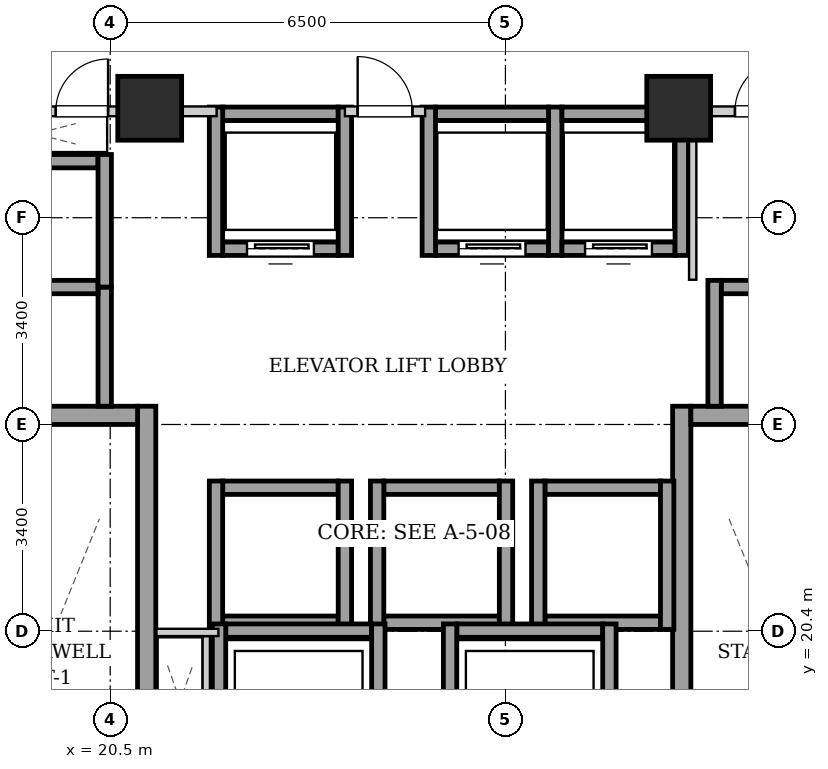
"""IFC4 building model, lengths in metres.
Left out: names, types, materials, properties, quantities, classifications, styles, units other than length and angle.
Written with IfcOpenShell. Run it as: python <this file> out.ifc"""

import sys

from ifc_helpers import new_model, si_unit, direction, frame, frame_2d, origin, origin_2d, place, context, subcontext, project, spatial, rectangle, extrude, element, fill, save


model = new_model("IFC4")
c1 = context("Model", 3, precision=1e-05, world=origin(), true_north=direction((0.0, 1.0)))
c2 = subcontext(c1, "Body", "Model", "MODEL_VIEW")
j1 = project(units=[si_unit("LENGTHUNIT", "METRE"), si_unit("PLANEANGLEUNIT", "RADIAN")], contexts=[c1])
p1 = place(None, origin())
s1 = spatial("IfcSite", under=j1, at=p1, CompositionType="ELEMENT")
p2 = place(p1, origin())
s2 = spatial("IfcBuilding", under=s1, at=p2, CompositionType="ELEMENT")
p3 = place(p2, frame((0.0, 0.0, 113.5)))
s3 = spatial("IfcBuildingStorey", under=s2, at=p3, CompositionType="ELEMENT", Elevation=113.5)
for number, where, z_axis, x_axis in (
    (1, (21.15, 29.0, 0.0), (0.0, 0.0, 1.0), (1.0, 0.0, 0.0)),
    (2, (29.85, 29.0, 0.0), (0.0, 0.0, 1.0), (1.0, 0.0, 0.0)),
):
    element("IfcColumn", number, at=place(p3, frame(where, z_axis=z_axis, x_axis=x_axis)), inside=s3, PredefinedType="COLUMN", context=c2, shape_type="SweptSolid", body=[
        extrude(rectangle(XDim=1.05, YDim=1.05, at=origin_2d()), origin(), (0.0, 0.0, 1.0), 3.2),
    ])
p4 = place(p3, frame((21.1, 15.1, 0.0), z_axis=(0.0, 0.0, 1.0), x_axis=(0.0, 1.0, 0.0)))
e3 = element("IfcWall", 3, at=p4, inside=s3, PredefinedType="SHEAR", context=c2, shape_type="SweptSolid", body=[
    extrude(rectangle(XDim=9.0, YDim=0.3, at=frame_2d((4.5, 0.0))), origin(), (0.0, 0.0, 1.0), 2.94),
])
p5 = place(p3, frame((18.1, 23.95, 0.0), z_axis=(0.0, 0.0, 1.0), x_axis=(1.0, 0.0, 0.0)))
e4 = element("IfcWall", 4, at=p5, inside=s3, PredefinedType="SHEAR", context=c2, shape_type="SweptSolid", body=[
    extrude(rectangle(XDim=2.85, YDim=0.3, at=frame_2d((1.425, 0.0))), origin(), (0.0, 0.0, 1.0), 2.94),
])
p6 = place(p3, frame((29.9, 15.1, 0.0), z_axis=(0.0, 0.0, 1.0), x_axis=(0.0, 1.0, 0.0)))
e5 = element("IfcWall", 5, at=p6, inside=s3, PredefinedType="SHEAR", context=c2, shape_type="SweptSolid", body=[
    extrude(rectangle(XDim=9.0, YDim=0.3, at=frame_2d((4.5, 0.0))), origin(), (0.0, 0.0, 1.0), 2.94),
])
p7 = place(p3, frame((30.05, 23.95, 0.0), z_axis=(0.0, 0.0, 1.0), x_axis=(1.0, 0.0, 0.0)))
e6 = element("IfcWall", 6, at=p7, inside=s3, PredefinedType="SHEAR", context=c2, shape_type="SweptSolid", body=[
    extrude(rectangle(XDim=2.85, YDim=0.3, at=frame_2d((1.425, 0.0))), origin(), (0.0, 0.0, 1.0), 2.94),
])
p8 = place(p3, frame((22.35, 26.69, 0.0), z_axis=(0.0, 0.0, 1.0), x_axis=(1.0, 0.0, 0.0)))
e7 = element("IfcWall", 7, at=p8, inside=s3, PredefinedType="SHEAR", context=c2, shape_type="SweptSolid", body=[
    extrude(rectangle(XDim=1.9, YDim=0.22, at=frame_2d((0.95, 0.0))), origin(), (0.0, 0.0, 1.0), 2.94),
])
p9 = place(p8, frame((0.4, 0.0, 0.0)))
e8 = element("IfcOpeningElement", 8, at=p9, cuts=e7, PredefinedType="OPENING", context=c2, shape_type="SweptSolid", body=[
    extrude(rectangle(XDim=1.1, YDim=2.15, at=frame_2d((0.55, 1.075))), frame((0.0, 0.12, 0.0), z_axis=(0.0, -1.0, 0.0), x_axis=(1.0, 0.0, 0.0)), (0.0, 0.0, 1.0), 0.24),
])
p10 = place(p3, frame((22.35, 28.91, 0.0), z_axis=(0.0, 0.0, 1.0), x_axis=(1.0, 0.0, 0.0)))
e9 = element("IfcWall", 9, at=p10, inside=s3, PredefinedType="SHEAR", context=c2, shape_type="SweptSolid", body=[
    extrude(rectangle(XDim=1.9, YDim=0.22, at=frame_2d((0.95, 0.0))), origin(), (0.0, 0.0, 1.0), 2.94),
])
for number, where, z_axis, x_axis in (
    (10, (22.24, 26.58, 0.0), (0.0, 0.0, 1.0), (0.0, 1.0, 0.0)),
    (11, (24.36, 26.58, 0.0), (0.0, 0.0, 1.0), (0.0, 1.0, 0.0)),
):
    element("IfcWall", number, at=place(p3, frame(where, z_axis=z_axis, x_axis=x_axis)), inside=s3, PredefinedType="SHEAR", context=c2, shape_type="SweptSolid", body=[
        extrude(rectangle(XDim=2.44, YDim=0.22, at=frame_2d((1.22, 0.0))), origin(), (0.0, 0.0, 1.0), 2.94),
    ])
p11 = place(p3, frame((25.85, 26.69, 0.0), z_axis=(0.0, 0.0, 1.0), x_axis=(1.0, 0.0, 0.0)))
e12 = element("IfcWall", 12, at=p11, inside=s3, PredefinedType="SHEAR", context=c2, shape_type="SweptSolid", body=[
    extrude(rectangle(XDim=1.86, YDim=0.22, at=frame_2d((0.93, 0.0))), origin(), (0.0, 0.0, 1.0), 2.94),
])
p12 = place(p11, frame((0.38, 0.0, 0.0)))
e13 = element("IfcOpeningElement", 13, at=p12, cuts=e12, PredefinedType="OPENING", context=c2, shape_type="SweptSolid", body=[
    extrude(rectangle(XDim=1.1, YDim=2.15, at=frame_2d((0.55, 1.075))), frame((0.0, 0.12, 0.0), z_axis=(0.0, -1.0, 0.0), x_axis=(1.0, 0.0, 0.0)), (0.0, 0.0, 1.0), 0.24),
])
p13 = place(p3, frame((25.85, 28.91, 0.0), z_axis=(0.0, 0.0, 1.0), x_axis=(1.0, 0.0, 0.0)))
e14 = element("IfcWall", 14, at=p13, inside=s3, PredefinedType="SHEAR", context=c2, shape_type="SweptSolid", body=[
    extrude(rectangle(XDim=1.86, YDim=0.22, at=frame_2d((0.93, 0.0))), origin(), (0.0, 0.0, 1.0), 2.94),
])
for number, where, z_axis, x_axis in (
    (15, (25.74, 26.58, 0.0), (0.0, 0.0, 1.0), (0.0, 1.0, 0.0)),
    (16, (27.82, 26.58, 0.0), (0.0, 0.0, 1.0), (0.0, 1.0, 0.0)),
):
    element("IfcWall", number, at=place(p3, frame(where, z_axis=z_axis, x_axis=x_axis)), inside=s3, PredefinedType="SHEAR", context=c2, shape_type="SweptSolid", body=[
        extrude(rectangle(XDim=2.44, YDim=0.22, at=frame_2d((1.22, 0.0))), origin(), (0.0, 0.0, 1.0), 2.94),
    ])
p14 = place(p3, frame((27.93, 26.69, 0.0), z_axis=(0.0, 0.0, 1.0), x_axis=(1.0, 0.0, 0.0)))
e17 = element("IfcWall", 17, at=p14, inside=s3, PredefinedType="SHEAR", context=c2, shape_type="SweptSolid", body=[
    extrude(rectangle(XDim=1.86, YDim=0.22, at=frame_2d((0.93, 0.0))), origin(), (0.0, 0.0, 1.0), 2.94),
])
p15 = place(p14, frame((0.38, 0.0, 0.0)))
e18 = element("IfcOpeningElement", 18, at=p15, cuts=e17, PredefinedType="OPENING", context=c2, shape_type="SweptSolid", body=[
    extrude(rectangle(XDim=1.1, YDim=2.15, at=frame_2d((0.55, 1.075))), frame((0.0, 0.12, 0.0), z_axis=(0.0, -1.0, 0.0), x_axis=(1.0, 0.0, 0.0)), (0.0, 0.0, 1.0), 0.24),
])
p16 = place(p3, frame((27.93, 28.91, 0.0), z_axis=(0.0, 0.0, 1.0), x_axis=(1.0, 0.0, 0.0)))
e19 = element("IfcWall", 19, at=p16, inside=s3, PredefinedType="SHEAR", context=c2, shape_type="SweptSolid", body=[
    extrude(rectangle(XDim=1.86, YDim=0.22, at=frame_2d((0.93, 0.0))), origin(), (0.0, 0.0, 1.0), 2.94),
])
p17 = place(p3, frame((29.9, 26.58, 0.0), z_axis=(0.0, 0.0, 1.0), x_axis=(0.0, 1.0, 0.0)))
e20 = element("IfcWall", 20, at=p17, inside=s3, PredefinedType="SHEAR", context=c2, shape_type="SweptSolid", body=[
    extrude(rectangle(XDim=2.44, YDim=0.22, at=frame_2d((1.22, 0.0))), origin(), (0.0, 0.0, 1.0), 2.94),
])
for number, where, z_axis, x_axis in (
    (21, (22.35, 20.54, 0.0), (0.0, 0.0, 1.0), (1.0, 0.0, 0.0)),
    (22, (22.35, 22.76, 0.0), (0.0, 0.0, 1.0), (1.0, 0.0, 0.0)),
):
    element("IfcWall", number, at=place(p3, frame(where, z_axis=z_axis, x_axis=x_axis)), inside=s3, PredefinedType="SHEAR", context=c2, shape_type="SweptSolid", body=[
        extrude(rectangle(XDim=1.9, YDim=0.22, at=frame_2d((0.95, 0.0))), origin(), (0.0, 0.0, 1.0), 2.94),
    ])
for number, where, z_axis, x_axis in (
    (23, (22.24, 20.43, 0.0), (0.0, 0.0, 1.0), (0.0, 1.0, 0.0)),
    (24, (24.36, 20.43, 0.0), (0.0, 0.0, 1.0), (0.0, 1.0, 0.0)),
):
    element("IfcWall", number, at=place(p3, frame(where, z_axis=z_axis, x_axis=x_axis)), inside=s3, PredefinedType="SHEAR", context=c2, shape_type="SweptSolid", body=[
        extrude(rectangle(XDim=2.44, YDim=0.22, at=frame_2d((1.22, 0.0))), origin(), (0.0, 0.0, 1.0), 2.94),
    ])
for number, where, z_axis, x_axis in (
    (25, (25.0, 20.54, 0.0), (0.0, 0.0, 1.0), (1.0, 0.0, 0.0)),
    (26, (25.0, 22.76, 0.0), (0.0, 0.0, 1.0), (1.0, 0.0, 0.0)),
):
    element("IfcWall", number, at=place(p3, frame(where, z_axis=z_axis, x_axis=x_axis)), inside=s3, PredefinedType="SHEAR", context=c2, shape_type="SweptSolid", body=[
        extrude(rectangle(XDim=1.9, YDim=0.22, at=frame_2d((0.95, 0.0))), origin(), (0.0, 0.0, 1.0), 2.94),
    ])
for number, where, z_axis, x_axis in (
    (27, (24.89, 20.43, 0.0), (0.0, 0.0, 1.0), (0.0, 1.0, 0.0)),
    (28, (27.01, 20.43, 0.0), (0.0, 0.0, 1.0), (0.0, 1.0, 0.0)),
):
    element("IfcWall", number, at=place(p3, frame(where, z_axis=z_axis, x_axis=x_axis)), inside=s3, PredefinedType="SHEAR", context=c2, shape_type="SweptSolid", body=[
        extrude(rectangle(XDim=2.44, YDim=0.22, at=frame_2d((1.22, 0.0))), origin(), (0.0, 0.0, 1.0), 2.94),
    ])
for number, where, z_axis, x_axis in (
    (29, (27.65, 20.54, 0.0), (0.0, 0.0, 1.0), (1.0, 0.0, 0.0)),
    (30, (27.65, 22.76, 0.0), (0.0, 0.0, 1.0), (1.0, 0.0, 0.0)),
):
    element("IfcWall", number, at=place(p3, frame(where, z_axis=z_axis, x_axis=x_axis)), inside=s3, PredefinedType="SHEAR", context=c2, shape_type="SweptSolid", body=[
        extrude(rectangle(XDim=1.9, YDim=0.22, at=frame_2d((0.95, 0.0))), origin(), (0.0, 0.0, 1.0), 2.94),
    ])
for number, where, z_axis, x_axis in (
    (31, (27.54, 20.43, 0.0), (0.0, 0.0, 1.0), (0.0, 1.0, 0.0)),
    (32, (29.66, 20.43, 0.0), (0.0, 0.0, 1.0), (0.0, 1.0, 0.0)),
):
    element("IfcWall", number, at=place(p3, frame(where, z_axis=z_axis, x_axis=x_axis)), inside=s3, PredefinedType="SHEAR", context=c2, shape_type="SweptSolid", body=[
        extrude(rectangle(XDim=2.44, YDim=0.22, at=frame_2d((1.22, 0.0))), origin(), (0.0, 0.0, 1.0), 2.94),
    ])
p18 = place(p3, frame((20.41, 24.1, 0.0), z_axis=(0.0, 0.0, 1.0), x_axis=(0.0, 1.0, 0.0)))
e33 = element("IfcWall", 33, at=p18, inside=s3, PredefinedType="SHEAR", context=c2, shape_type="SweptSolid", body=[
    extrude(rectangle(XDim=1.96, YDim=0.22, at=frame_2d((0.98, 0.0))), origin(), (0.0, 0.0, 1.0), 2.94),
])
for number, where, z_axis, x_axis in (
    (34, (18.4, 26.06, 0.0), (0.0, 0.0, 1.0), (1.0, 0.0, 0.0)),
    (35, (18.4, 28.13, 0.0), (0.0, 0.0, 1.0), (1.0, 0.0, 0.0)),
):
    element("IfcWall", number, at=place(p3, frame(where, z_axis=z_axis, x_axis=x_axis)), inside=s3, PredefinedType="SHEAR", context=c2, shape_type="SweptSolid", body=[
        extrude(rectangle(XDim=1.9, YDim=0.22, at=frame_2d((0.95, 0.0))), origin(), (0.0, 0.0, 1.0), 2.94),
    ])
p19 = place(p3, frame((20.41, 26.06, 0.0), z_axis=(0.0, 0.0, 1.0), x_axis=(0.0, 1.0, 0.0)))
e36 = element("IfcWall", 36, at=p19, inside=s3, PredefinedType="SHEAR", context=c2, shape_type="SweptSolid", body=[
    extrude(rectangle(XDim=2.18, YDim=0.22, at=frame_2d((1.09, 0.0))), origin(), (0.0, 0.0, 1.0), 2.94),
])
p20 = place(p3, frame((30.55, 26.06, 0.0), z_axis=(0.0, 0.0, 1.0), x_axis=(1.0, 0.0, 0.0)))
e37 = element("IfcWall", 37, at=p20, inside=s3, PredefinedType="SHEAR", context=c2, shape_type="SweptSolid", body=[
    extrude(rectangle(XDim=1.9, YDim=0.22, at=frame_2d((0.95, 0.0))), origin(), (0.0, 0.0, 1.0), 2.94),
])
p21 = place(p3, frame((30.44, 24.1, 0.0), z_axis=(0.0, 0.0, 1.0), x_axis=(0.0, 1.0, 0.0)))
e38 = element("IfcWall", 38, at=p21, inside=s3, PredefinedType="SHEAR", context=c2, shape_type="SweptSolid", body=[
    extrude(rectangle(XDim=2.07, YDim=0.22, at=frame_2d((1.035, 0.0))), origin(), (0.0, 0.0, 1.0), 2.94),
])
p22 = place(p3, frame((22.4, 20.41, 0.0), z_axis=(0.0, 0.0, 1.0), x_axis=(1.0, 0.0, 0.0)))
e39 = element("IfcWall", 39, at=p22, inside=s3, PredefinedType="SHEAR", context=c2, shape_type="SweptSolid", body=[
    extrude(rectangle(XDim=2.4, YDim=0.22, at=frame_2d((1.2, 0.0))), origin(), (0.0, 0.0, 1.0), 2.94),
])
for number, where, z_axis, x_axis in (
    (40, (22.29, 17.98, 0.0), (0.0, 0.0, 1.0), (0.0, 1.0, 0.0)),
    (41, (24.91, 17.98, 0.0), (0.0, 0.0, 1.0), (0.0, 1.0, 0.0)),
):
    element("IfcWall", number, at=place(p3, frame(where, z_axis=z_axis, x_axis=x_axis)), inside=s3, PredefinedType="SHEAR", context=c2, shape_type="SweptSolid", body=[
        extrude(rectangle(XDim=2.54, YDim=0.22, at=frame_2d((1.27, 0.0))), origin(), (0.0, 0.0, 1.0), 2.94),
    ])
p23 = place(p3, frame((26.2, 20.41, 0.0), z_axis=(0.0, 0.0, 1.0), x_axis=(1.0, 0.0, 0.0)))
e42 = element("IfcWall", 42, at=p23, inside=s3, PredefinedType="SHEAR", context=c2, shape_type="SweptSolid", body=[
    extrude(rectangle(XDim=2.4, YDim=0.22, at=frame_2d((1.2, 0.0))), origin(), (0.0, 0.0, 1.0), 2.94),
])
for number, where, z_axis, x_axis in (
    (43, (26.09, 17.98, 0.0), (0.0, 0.0, 1.0), (0.0, 1.0, 0.0)),
    (44, (28.71, 17.98, 0.0), (0.0, 0.0, 1.0), (0.0, 1.0, 0.0)),
):
    element("IfcWall", number, at=place(p3, frame(where, z_axis=z_axis, x_axis=x_axis)), inside=s3, PredefinedType="SHEAR", context=c2, shape_type="SweptSolid", body=[
        extrude(rectangle(XDim=2.54, YDim=0.22, at=frame_2d((1.27, 0.0))), origin(), (0.0, 0.0, 1.0), 2.94),
    ])
p24 = place(p3, frame((24.36, 28.95, 0.0), z_axis=(0.0, 0.0, 1.0), x_axis=(1.0, 0.0, 0.0)))
e45 = element("IfcWall", 45, at=p24, inside=s3, PredefinedType="PARTITIONING", context=c2, shape_type="SweptSolid", body=[
    extrude(rectangle(XDim=1.32, YDim=0.16, at=frame_2d((0.66, 0.0))), origin(), (0.0, 0.0, 1.0), 2.313),
])
p25 = place(p24, frame((0.21, 0.0, 0.0)))
e46 = element("IfcOpeningElement", 46, at=p25, cuts=e45, PredefinedType="OPENING", context=c2, shape_type="SweptSolid", body=[
    extrude(rectangle(XDim=0.9, YDim=2.05, at=frame_2d((0.45, 1.025))), frame((0.0, 0.09, 0.0), z_axis=(0.0, -1.0, 0.0), x_axis=(1.0, 0.0, 0.0)), (0.0, 0.0, 1.0), 0.18),
])
p26 = place(p3, frame((17.96, 28.95, 0.0), z_axis=(0.0, 0.0, 1.0), x_axis=(1.0, 0.0, 0.0)))
e47 = element("IfcWall", 47, at=p26, inside=s3, PredefinedType="PARTITIONING", context=c2, shape_type="SweptSolid", body=[
    extrude(rectangle(XDim=4.29, YDim=0.16, at=frame_2d((2.145, 0.0))), origin(), (0.0, 0.0, 1.0), 2.313),
])
p27 = place(p26, frame((1.645, 0.0, 0.0)))
e48 = element("IfcOpeningElement", 48, at=p27, cuts=e47, PredefinedType="OPENING", context=c2, shape_type="SweptSolid", body=[
    extrude(rectangle(XDim=0.86, YDim=2.05, at=frame_2d((0.43, 1.025))), frame((0.0, 0.09, 0.0), z_axis=(0.0, -1.0, 0.0), x_axis=(1.0, 0.0, 0.0)), (0.0, 0.0, 1.0), 0.18),
])
p28 = place(p3, frame((22.08, 18.2, 0.0), z_axis=(0.0, 0.0, 1.0), x_axis=(0.0, 1.0, 0.0)))
e49 = element("IfcWall", 49, at=p28, inside=s3, PredefinedType="PARTITIONING", context=c2, shape_type="SweptSolid", body=[
    extrude(rectangle(XDim=2.12, YDim=0.12, at=frame_2d((1.06, 0.0))), origin(), (0.0, 0.0, 1.0), 2.94),
])
p29 = place(p3, frame((22.28, 20.38, 0.0), z_axis=(0.0, 0.0, 1.0), x_axis=(-1.0, 0.0, 0.0)))
e50 = element("IfcWall", 50, at=p29, inside=s3, PredefinedType="PARTITIONING", context=c2, shape_type="SweptSolid", body=[
    extrude(rectangle(XDim=1.02, YDim=0.12, at=frame_2d((0.51, 0.0))), origin(), (0.0, 0.0, 1.0), 2.94),
])
p30 = place(p3, frame((30.08, 26.18, 0.0), z_axis=(0.0, 0.0, 1.0), x_axis=(0.0, 1.0, 0.0)))
e51 = element("IfcWall", 51, at=p30, inside=s3, PredefinedType="PARTITIONING", context=c2, shape_type="SweptSolid", body=[
    extrude(rectangle(XDim=2.68, YDim=0.12, at=frame_2d((1.34, 0.0))), origin(), (0.0, 0.0, 1.0), 2.94),
])
p31 = place(p3, frame((30.08, 28.95, 0.0), z_axis=(0.0, 0.0, 1.0), x_axis=(1.0, 0.0, 0.0)))
e52 = element("IfcWall", 52, at=p31, inside=s3, PredefinedType="PARTITIONING", context=c2, shape_type="SweptSolid", body=[
    extrude(rectangle(XDim=2.96, YDim=0.16, at=frame_2d((1.48, 0.0))), origin(), (0.0, 0.0, 1.0), 2.94),
])
p32 = place(p31, frame((0.695, 0.0, 0.0)))
e53 = element("IfcOpeningElement", 53, at=p32, cuts=e52, PredefinedType="OPENING", context=c2, shape_type="SweptSolid", body=[
    extrude(rectangle(XDim=0.86, YDim=2.05, at=frame_2d((0.43, 1.025))), frame((0.0, 0.09, 0.0), z_axis=(0.0, -1.0, 0.0), x_axis=(1.0, 0.0, 0.0)), (0.0, 0.0, 1.0), 0.18),
])
p33 = place(p9, origin())
e54 = element("IfcDoor", 54, at=p33, inside=s3, OperationType="SLIDING_TO_LEFT", PredefinedType="DOOR", context=c2, shape_type="SweptSolid", body=[
    extrude(rectangle(XDim=1.1, YDim=2.15, at=frame_2d((0.55, 1.075))), frame((0.0, 0.025, 0.0), z_axis=(0.0, -1.0, 0.0), x_axis=(1.0, 0.0, 0.0)), (0.0, 0.0, 1.0), 0.05),
])
fill(e8, e54)
p34 = place(p12, origin())
e55 = element("IfcDoor", 55, at=p34, inside=s3, OperationType="SLIDING_TO_LEFT", PredefinedType="DOOR", context=c2, shape_type="SweptSolid", body=[
    extrude(rectangle(XDim=1.1, YDim=2.15, at=frame_2d((0.55, 1.075))), frame((0.0, 0.025, 0.0), z_axis=(0.0, -1.0, 0.0), x_axis=(1.0, 0.0, 0.0)), (0.0, 0.0, 1.0), 0.05),
])
fill(e13, e55)
p35 = place(p15, origin())
e56 = element("IfcDoor", 56, at=p35, inside=s3, OperationType="SLIDING_TO_LEFT", PredefinedType="DOOR", context=c2, shape_type="SweptSolid", body=[
    extrude(rectangle(XDim=1.1, YDim=2.15, at=frame_2d((0.55, 1.075))), frame((0.0, 0.025, 0.0), z_axis=(0.0, -1.0, 0.0), x_axis=(1.0, 0.0, 0.0)), (0.0, 0.0, 1.0), 0.05),
])
fill(e18, e56)
p36 = place(p25, origin())
e57 = element("IfcDoor", 57, at=p36, inside=s3, OperationType="SINGLE_SWING_LEFT", PredefinedType="DOOR", context=c2, shape_type="SweptSolid", body=[
    extrude(rectangle(XDim=0.9, YDim=2.05, at=frame_2d((0.45, 1.025))), frame((0.0, 0.025, 0.0), z_axis=(0.0, -1.0, 0.0), x_axis=(1.0, 0.0, 0.0)), (0.0, 0.0, 1.0), 0.05),
])
fill(e46, e57)
p37 = place(p27, origin())
e58 = element("IfcDoor", 58, at=p37, inside=s3, OperationType="SINGLE_SWING_RIGHT", PredefinedType="DOOR", context=c2, shape_type="SweptSolid", body=[
    extrude(rectangle(XDim=0.86, YDim=2.05, at=frame_2d((0.43, 1.025))), frame((0.0, 0.025, 0.0), z_axis=(0.0, -1.0, 0.0), x_axis=(1.0, 0.0, 0.0)), (0.0, 0.0, 1.0), 0.05),
])
fill(e48, e58)
p38 = place(p32, origin())
e59 = element("IfcDoor", 59, at=p38, inside=s3, OperationType="SINGLE_SWING_RIGHT", PredefinedType="DOOR", context=c2, shape_type="SweptSolid", body=[
    extrude(rectangle(XDim=0.86, YDim=2.05, at=frame_2d((0.43, 1.025))), frame((0.0, 0.025, 0.0), z_axis=(0.0, -1.0, 0.0), x_axis=(1.0, 0.0, 0.0)), (0.0, 0.0, 1.0), 0.05),
])
fill(e53, e59)
save(model, sys.argv[1])
